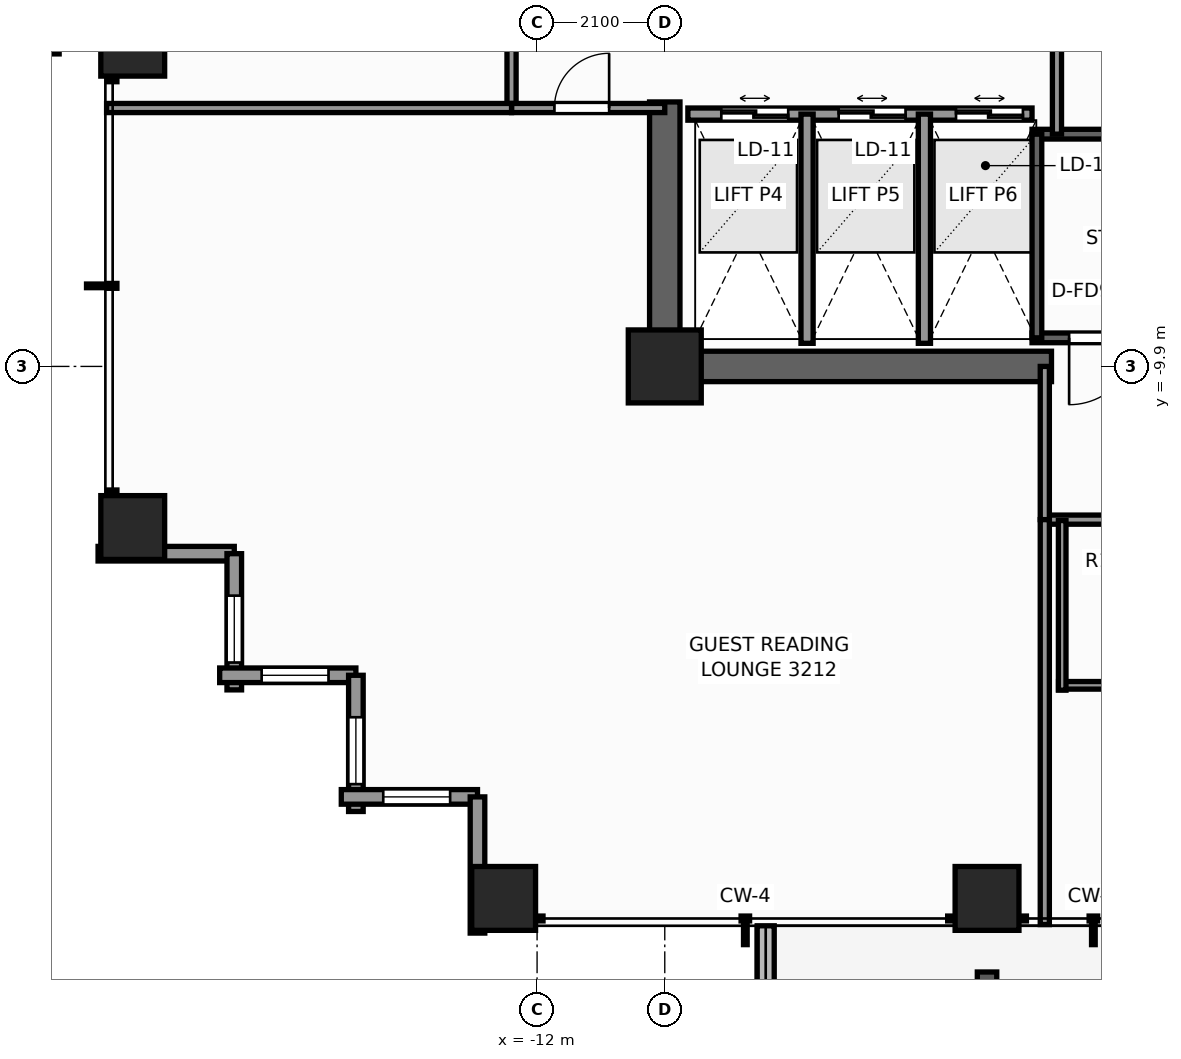
"""IFC4 building model, lengths in metres.
Left out: names, types, materials, properties, quantities, classifications, styles, units other than length and angle.
Written with IfcOpenShell. Run it as: python <this file> out.ifc"""

import sys

from ifc_helpers import new_model, si_unit, direction, frame, frame_2d, origin, origin_2d, place, context, subcontext, project, spatial, rectangle, extrude, element, fill, save


model = new_model("IFC4")
c1 = context("Model", 3, precision=1e-05, world=origin(), true_north=direction((0.0, 1.0)))
c2 = subcontext(c1, "Body", "Model", "MODEL_VIEW")
j1 = project(units=[si_unit("LENGTHUNIT", "METRE"), si_unit("PLANEANGLEUNIT", "RADIAN")], contexts=[c1])
p1 = place(None, origin())
s1 = spatial("IfcSite", under=j1, at=p1, CompositionType="ELEMENT")
p2 = place(p1, origin())
s2 = spatial("IfcBuilding", under=s1, at=p2, CompositionType="ELEMENT")
p3 = place(p2, frame((0.0, 0.0, 111.8)))
s3 = spatial("IfcBuildingStorey", under=s2, at=p3, CompositionType="ELEMENT", Elevation=111.8)
p4 = place(p3, frame((-3.54, -9.9, 0.0), z_axis=(0.0, 0.0, 1.0), x_axis=(-1.0, 0.0, 0.0)))
e1 = element("IfcWall", 1, at=p4, inside=s3, PredefinedType="SHEAR", context=c2, shape_type="SweptSolid", body=[
    extrude(rectangle(XDim=6.61, YDim=0.5, at=frame_2d((3.305, 0.0))), origin(), (0.0, 0.0, 1.0), 3.3),
])
p5 = place(p3, frame((-9.9, -9.65, 0.0), z_axis=(0.0, 0.0, 1.0), x_axis=(0.0, 1.0, 0.0)))
e2 = element("IfcWall", 2, at=p5, inside=s3, PredefinedType="SHEAR", context=c2, shape_type="SweptSolid", body=[
    extrude(rectangle(XDim=4.1, YDim=0.5, at=frame_2d((2.05, 0.0))), origin(), (0.0, 0.0, 1.0), 3.3),
])
p6 = place(p3, frame((-9.9, -9.9, 0.0), z_axis=(0.0, 0.0, 1.0), x_axis=(1.0, 0.0, 0.0)))
e3 = element("IfcColumn", 3, at=p6, inside=s3, PredefinedType="COLUMN", context=c2, shape_type="SweptSolid", body=[
    extrude(rectangle(XDim=1.2, YDim=1.2, at=origin_2d()), origin(), (0.0, 0.0, 1.0), 3.3),
])
for number, where, z_axis, x_axis in (
    (4, (-12.55, -18.65, 0.0), (0.0, 0.0, 1.0), (1.0, 0.0, 0.0)),
    (5, (-4.6, -18.65, 0.0), (0.0, 0.0, 1.0), (1.0, 0.0, 0.0)),
    (6, (-18.65, -12.55, 0.0), (0.0, 0.0, 1.0), (1.0, 0.0, 0.0)),
    (7, (-18.65, -4.6, 0.0), (0.0, 0.0, 1.0), (1.0, 0.0, 0.0)),
):
    element("IfcColumn", number, at=place(p3, frame(where, z_axis=z_axis, x_axis=x_axis)), inside=s3, PredefinedType="COLUMN", context=c2, shape_type="SweptSolid", body=[
        extrude(rectangle(XDim=1.05, YDim=1.05, at=origin_2d()), origin(), (0.0, 0.0, 1.0), 3.3),
    ])
p7 = place(p3, frame((-8.24, -19.1, -0.04), z_axis=(0.0, 0.0, 1.0), x_axis=(0.0, -1.0, 0.0)))
e8 = element("IfcWall", 8, at=p7, inside=s3, PredefinedType="PARAPET", context=c2, shape_type="SweptSolid", body=[
    extrude(rectangle(XDim=1.466, YDim=0.28, at=frame_2d((0.733, 0.0))), origin(), (0.0, 0.0, 1.0), 0.42),
])
p8 = place(p3, frame((-16.98, -12.98, 0.0), z_axis=(0.0, 0.0, 1.0), x_axis=(-1.0, 0.0, 0.0)))
e9 = element("IfcWall", 9, at=p8, inside=s3, PredefinedType="STANDARD", context=c2, shape_type="SweptSolid", body=[
    extrude(rectangle(XDim=2.24, YDim=0.24, at=frame_2d((1.12, 0.0))), origin(), (0.0, 0.0, 1.0), 2.459),
])
p9 = place(p3, frame((-16.98, -15.22, 0.0), z_axis=(0.0, 0.0, 1.0), x_axis=(0.0, 1.0, 0.0)))
e10 = element("IfcWall", 10, at=p9, inside=s3, PredefinedType="STANDARD", context=c2, shape_type="SweptSolid", body=[
    extrude(rectangle(XDim=2.24, YDim=0.24, at=frame_2d((1.12, 0.0))), origin(), (0.0, 0.0, 1.0), 2.459),
])
p10 = place(p9, frame((0.45, 0.0, 0.65)))
e11 = element("IfcOpeningElement", 11, at=p10, cuts=e10, PredefinedType="OPENING", context=c2, shape_type="SweptSolid", body=[
    extrude(rectangle(XDim=1.1, YDim=1.45, at=frame_2d((0.55, 0.725))), frame((0.0, 0.13, 0.0), z_axis=(0.0, -1.0, 0.0), x_axis=(1.0, 0.0, 0.0)), (0.0, 0.0, 1.0), 0.26),
])
p11 = place(p3, frame((-14.98, -14.98, 0.0), z_axis=(0.0, 0.0, 1.0), x_axis=(-1.0, 0.0, 0.0)))
e12 = element("IfcWall", 12, at=p11, inside=s3, PredefinedType="STANDARD", context=c2, shape_type="SweptSolid", body=[
    extrude(rectangle(XDim=2.24, YDim=0.24, at=frame_2d((1.12, 0.0))), origin(), (0.0, 0.0, 1.0), 2.459),
])
p12 = place(p11, frame((0.45, 0.0, 0.65)))
e13 = element("IfcOpeningElement", 13, at=p12, cuts=e12, PredefinedType="OPENING", context=c2, shape_type="SweptSolid", body=[
    extrude(rectangle(XDim=1.1, YDim=1.45, at=frame_2d((0.55, 0.725))), frame((0.0, 0.13, 0.0), z_axis=(0.0, -1.0, 0.0), x_axis=(1.0, 0.0, 0.0)), (0.0, 0.0, 1.0), 0.26),
])
p13 = place(p3, frame((-14.98, -17.22, 0.0), z_axis=(0.0, 0.0, 1.0), x_axis=(0.0, 1.0, 0.0)))
e14 = element("IfcWall", 14, at=p13, inside=s3, PredefinedType="STANDARD", context=c2, shape_type="SweptSolid", body=[
    extrude(rectangle(XDim=2.24, YDim=0.24, at=frame_2d((1.12, 0.0))), origin(), (0.0, 0.0, 1.0), 2.459),
])
p14 = place(p13, frame((0.45, 0.0, 0.65)))
e15 = element("IfcOpeningElement", 15, at=p14, cuts=e14, PredefinedType="OPENING", context=c2, shape_type="SweptSolid", body=[
    extrude(rectangle(XDim=1.1, YDim=1.45, at=frame_2d((0.55, 0.725))), frame((0.0, 0.13, 0.0), z_axis=(0.0, -1.0, 0.0), x_axis=(1.0, 0.0, 0.0)), (0.0, 0.0, 1.0), 0.26),
])
p15 = place(p3, frame((-12.98, -16.98, 0.0), z_axis=(0.0, 0.0, 1.0), x_axis=(-1.0, 0.0, 0.0)))
e16 = element("IfcWall", 16, at=p15, inside=s3, PredefinedType="STANDARD", context=c2, shape_type="SweptSolid", body=[
    extrude(rectangle(XDim=2.24, YDim=0.24, at=frame_2d((1.12, 0.0))), origin(), (0.0, 0.0, 1.0), 2.459),
])
p16 = place(p15, frame((0.45, 0.0, 0.65)))
e17 = element("IfcOpeningElement", 17, at=p16, cuts=e16, PredefinedType="OPENING", context=c2, shape_type="SweptSolid", body=[
    extrude(rectangle(XDim=1.1, YDim=1.45, at=frame_2d((0.55, 0.725))), frame((0.0, 0.13, 0.0), z_axis=(0.0, -1.0, 0.0), x_axis=(1.0, 0.0, 0.0)), (0.0, 0.0, 1.0), 0.26),
])
p17 = place(p3, frame((-12.98, -19.22, 0.0), z_axis=(0.0, 0.0, 1.0), x_axis=(0.0, 1.0, 0.0)))
e18 = element("IfcWall", 18, at=p17, inside=s3, PredefinedType="STANDARD", context=c2, shape_type="SweptSolid", body=[
    extrude(rectangle(XDim=2.24, YDim=0.24, at=frame_2d((1.12, 0.0))), origin(), (0.0, 0.0, 1.0), 2.459),
])
p18 = place(p3, frame((3.86, -9.43, 0.0), z_axis=(0.0, 0.0, 1.0), x_axis=(-1.0, 0.0, 0.0)))
e19 = element("IfcWall", 19, at=p18, inside=s3, PredefinedType="SHEAR", context=c2, shape_type="SweptSolid", body=[
    extrude(rectangle(XDim=7.72, YDim=0.16, at=frame_2d((3.86, 0.0))), origin(), (0.0, 0.0, 1.0), 3.3),
])
p19 = place(p18, frame((6.01, 0.0, 0.0)))
e20 = element("IfcOpeningElement", 20, at=p19, cuts=e19, PredefinedType="OPENING", context=c2, shape_type="SweptSolid", body=[
    extrude(rectangle(XDim=1.1, YDim=2.2, at=frame_2d((0.55, 1.1))), frame((0.0, 0.09, 0.0), z_axis=(0.0, -1.0, 0.0), x_axis=(1.0, 0.0, 0.0)), (0.0, 0.0, 1.0), 0.18),
])
p20 = place(p3, frame((-3.86, -6.08, 0.0), z_axis=(0.0, 0.0, 1.0), x_axis=(1.0, 0.0, 0.0)))
e21 = element("IfcWall", 21, at=p20, inside=s3, PredefinedType="SHEAR", context=c2, shape_type="SweptSolid", body=[
    extrude(rectangle(XDim=7.72, YDim=0.16, at=frame_2d((3.86, 0.0))), origin(), (0.0, 0.0, 1.0), 3.3),
])
p21 = place(p3, frame((-3.78, -9.43, 0.0), z_axis=(0.0, 0.0, 1.0), x_axis=(0.0, 1.0, 0.0)))
e22 = element("IfcWall", 22, at=p21, inside=s3, PredefinedType="SHEAR", context=c2, shape_type="SweptSolid", body=[
    extrude(rectangle(XDim=3.35, YDim=0.16, at=frame_2d((1.675, 0.0))), origin(), (0.0, 0.0, 1.0), 3.3),
])
p22 = place(p3, frame((-9.52, -5.75, 0.0), z_axis=(0.0, 0.0, 1.0), x_axis=(1.0, 0.0, 0.0)))
e23 = element("IfcWall", 23, at=p22, inside=s3, PredefinedType="SOLIDWALL", context=c2, shape_type="SweptSolid", body=[
    extrude(rectangle(XDim=5.66, YDim=0.2, at=frame_2d((2.83, 0.0))), origin(), (0.0, 0.0, 1.0), 3.08),
])
p23 = place(p22, frame((0.55, 0.0, 0.0)))
e24 = element("IfcOpeningElement", 24, at=p23, cuts=e23, PredefinedType="OPENING", context=c2, shape_type="SweptSolid", body=[
    extrude(rectangle(XDim=1.1, YDim=2.2, at=frame_2d((0.55, 1.1))), frame((0.0, 0.11, 0.0), z_axis=(0.0, -1.0, 0.0), x_axis=(1.0, 0.0, 0.0)), (0.0, 0.0, 1.0), 0.22),
])
p24 = place(p22, frame((2.48, 0.0, 0.0)))
e25 = element("IfcOpeningElement", 25, at=p24, cuts=e23, PredefinedType="OPENING", context=c2, shape_type="SweptSolid", body=[
    extrude(rectangle(XDim=1.1, YDim=2.2, at=frame_2d((0.55, 1.1))), frame((0.0, 0.11, 0.0), z_axis=(0.0, -1.0, 0.0), x_axis=(1.0, 0.0, 0.0)), (0.0, 0.0, 1.0), 0.22),
])
p25 = place(p22, frame((4.41, 0.0, 0.0)))
e26 = element("IfcOpeningElement", 26, at=p25, cuts=e23, PredefinedType="OPENING", context=c2, shape_type="SweptSolid", body=[
    extrude(rectangle(XDim=1.1, YDim=2.2, at=frame_2d((0.55, 1.1))), frame((0.0, 0.11, 0.0), z_axis=(0.0, -1.0, 0.0), x_axis=(1.0, 0.0, 0.0)), (0.0, 0.0, 1.0), 0.22),
])
for number, where, z_axis, x_axis in (
    (27, (-7.56, -9.52, 0.0), (0.0, 0.0, 1.0), (0.0, 1.0, 0.0)),
    (28, (-5.63, -9.52, 0.0), (0.0, 0.0, 1.0), (0.0, 1.0, 0.0)),
):
    element("IfcWall", number, at=place(p3, frame(where, z_axis=z_axis, x_axis=x_axis)), inside=s3, PredefinedType="SOLIDWALL", context=c2, shape_type="SweptSolid", body=[
        extrude(rectangle(XDim=3.77, YDim=0.2, at=frame_2d((1.885, 0.0))), origin(), (0.0, 0.0, 1.0), 3.08),
    ])
p26 = place(p3, frame((-3.45, -6.08, 0.0), z_axis=(0.0, 0.0, 1.0), x_axis=(0.0, 1.0, 0.0)))
e29 = element("IfcWall", 29, at=p26, inside=s3, PredefinedType="PARTITIONING", context=c2, shape_type="SweptSolid", body=[
    extrude(rectangle(XDim=2.36, YDim=0.15, at=frame_2d((1.18, 0.0))), origin(), (0.0, 0.0, 1.0), 3.08),
])
p27 = place(p3, frame((-3.65, -12.42, 0.0), z_axis=(0.0, 0.0, 1.0), x_axis=(1.0, 0.0, 0.0)))
e30 = element("IfcWall", 30, at=p27, inside=s3, PredefinedType="PARTITIONING", context=c2, shape_type="SweptSolid", body=[
    extrude(rectangle(XDim=15.91, YDim=0.15, at=frame_2d((7.955, 0.0))), origin(), (0.0, 0.0, 1.0), 2.292),
])
p28 = place(p27, frame((4.612, 0.0, 0.0)))
e31 = element("IfcOpeningElement", 31, at=p28, cuts=e30, PredefinedType="OPENING", context=c2, shape_type="SweptSolid", body=[
    extrude(rectangle(XDim=0.95, YDim=2.06, at=frame_2d((0.475, 1.03))), frame((0.0, 0.085, 0.0), z_axis=(0.0, -1.0, 0.0), x_axis=(1.0, 0.0, 0.0)), (0.0, 0.0, 1.0), 0.17),
])
p29 = place(p27, frame((9.17, 0.0, 0.0)))
e32 = element("IfcOpeningElement", 32, at=p29, cuts=e30, PredefinedType="OPENING", context=c2, shape_type="SweptSolid", body=[
    extrude(rectangle(XDim=0.95, YDim=2.06, at=frame_2d((0.475, 1.03))), frame((0.0, 0.085, 0.0), z_axis=(0.0, -1.0, 0.0), x_axis=(1.0, 0.0, 0.0)), (0.0, 0.0, 1.0), 0.17),
])
p30 = place(p27, frame((11.192, 0.0, 0.0)))
e33 = element("IfcOpeningElement", 33, at=p30, cuts=e30, PredefinedType="OPENING", context=c2, shape_type="SweptSolid", body=[
    extrude(rectangle(XDim=0.95, YDim=2.06, at=frame_2d((0.475, 1.03))), frame((0.0, 0.085, 0.0), z_axis=(0.0, -1.0, 0.0), x_axis=(1.0, 0.0, 0.0)), (0.0, 0.0, 1.0), 0.17),
])
p31 = place(p3, frame((-3.65, -12.42, 0.0), z_axis=(0.0, 0.0, 1.0), x_axis=(0.0, 1.0, 0.0)))
e34 = element("IfcWall", 34, at=p31, inside=s3, PredefinedType="PARTITIONING", context=c2, shape_type="SweptSolid", body=[
    extrude(rectangle(XDim=2.52, YDim=0.15, at=frame_2d((1.26, 0.0))), origin(), (0.0, 0.0, 1.0), 3.08),
])
p32 = place(p3, frame((-12.42, -5.65, 0.0), z_axis=(0.0, 0.0, 1.0), x_axis=(0.0, 1.0, 0.0)))
e35 = element("IfcWall", 35, at=p32, inside=s3, PredefinedType="PARTITIONING", context=c2, shape_type="SweptSolid", body=[
    extrude(rectangle(XDim=3.6, YDim=0.15, at=frame_2d((1.8, 0.0))), origin(), (0.0, 0.0, 1.0), 2.292),
])
p33 = place(p32, frame((2.156, 0.0, 0.0)))
e36 = element("IfcOpeningElement", 36, at=p33, cuts=e35, PredefinedType="OPENING", context=c2, shape_type="SweptSolid", body=[
    extrude(rectangle(XDim=0.9, YDim=2.06, at=frame_2d((0.45, 1.03))), frame((0.0, 0.085, 0.0), z_axis=(0.0, -1.0, 0.0), x_axis=(1.0, 0.0, 0.0)), (0.0, 0.0, 1.0), 0.17),
])
p34 = place(p3, frame((-12.42, -5.65, 0.0), z_axis=(0.0, 0.0, 1.0), x_axis=(1.0, 0.0, 0.0)))
e37 = element("IfcWall", 37, at=p34, inside=s3, PredefinedType="PARTITIONING", context=c2, shape_type="SweptSolid", body=[
    extrude(rectangle(XDim=2.52, YDim=0.15, at=frame_2d((1.26, 0.0))), origin(), (0.0, 0.0, 1.0), 3.08),
])
p35 = place(p34, frame((0.705, 0.0, 0.0)))
e38 = element("IfcOpeningElement", 38, at=p35, cuts=e37, PredefinedType="OPENING", context=c2, shape_type="SweptSolid", body=[
    extrude(rectangle(XDim=0.9, YDim=2.06, at=frame_2d((0.45, 1.03))), frame((0.0, 0.085, 0.0), z_axis=(0.0, -1.0, 0.0), x_axis=(1.0, 0.0, 0.0)), (0.0, 0.0, 1.0), 0.17),
])
for number, where, z_axis, x_axis in (
    (39, (-19.08, -5.65, 0.0), (0.0, 0.0, 1.0), (1.0, 0.0, 0.0)),
    (40, (-3.65, -19.08, 0.0), (0.0, 0.0, 1.0), (0.0, 1.0, 0.0)),
):
    element("IfcWall", number, at=place(p3, frame(where, z_axis=z_axis, x_axis=x_axis)), inside=s3, PredefinedType="PARTITIONING", context=c2, shape_type="SweptSolid", body=[
        extrude(rectangle(XDim=6.66, YDim=0.15, at=frame_2d((3.33, 0.0))), origin(), (0.0, 0.0, 1.0), 2.449),
    ])
p36 = place(p3, frame((-3.424, -15.145, 0.0), z_axis=(0.0, 0.0, 1.0), x_axis=(1.0, 0.0, 0.0)))
e41 = element("IfcWall", 41, at=p36, inside=s3, PredefinedType="PARTITIONING", context=c2, shape_type="SweptSolid", body=[
    extrude(rectangle(XDim=2.37, YDim=0.125, at=frame_2d((1.185, 0.0))), origin(), (0.0, 0.0, 1.0), 3.08),
])
p37 = place(p3, frame((-3.364, -15.225, 0.0), z_axis=(0.0, 0.0, 1.0), x_axis=(0.0, 1.0, 0.0)))
e42 = element("IfcWall", 42, at=p37, inside=s3, PredefinedType="PARTITIONING", context=c2, shape_type="SweptSolid", body=[
    extrude(rectangle(XDim=2.79, YDim=0.125, at=frame_2d((1.395, 0.0))), origin(), (0.0, 0.0, 1.0), 3.08),
])
p38 = place(p10, origin())
e43 = element("IfcWindow", 43, at=p38, inside=s3, PartitioningType="SINGLE_PANEL", PredefinedType="WINDOW", context=c2, shape_type="SweptSolid", body=[
    extrude(rectangle(XDim=1.1, YDim=1.45, at=frame_2d((0.55, 0.725))), frame((0.0, 0.03, 0.0), z_axis=(0.0, -1.0, 0.0), x_axis=(1.0, 0.0, 0.0)), (0.0, 0.0, 1.0), 0.06),
])
fill(e11, e43)
p39 = place(p12, origin())
e44 = element("IfcWindow", 44, at=p39, inside=s3, PartitioningType="SINGLE_PANEL", PredefinedType="WINDOW", context=c2, shape_type="SweptSolid", body=[
    extrude(rectangle(XDim=1.1, YDim=1.45, at=frame_2d((0.55, 0.725))), frame((0.0, 0.03, 0.0), z_axis=(0.0, -1.0, 0.0), x_axis=(1.0, 0.0, 0.0)), (0.0, 0.0, 1.0), 0.06),
])
fill(e13, e44)
p40 = place(p14, origin())
e45 = element("IfcWindow", 45, at=p40, inside=s3, PartitioningType="SINGLE_PANEL", PredefinedType="WINDOW", context=c2, shape_type="SweptSolid", body=[
    extrude(rectangle(XDim=1.1, YDim=1.45, at=frame_2d((0.55, 0.725))), frame((0.0, 0.03, 0.0), z_axis=(0.0, -1.0, 0.0), x_axis=(1.0, 0.0, 0.0)), (0.0, 0.0, 1.0), 0.06),
])
fill(e15, e45)
p41 = place(p16, origin())
e46 = element("IfcWindow", 46, at=p41, inside=s3, PartitioningType="SINGLE_PANEL", PredefinedType="WINDOW", context=c2, shape_type="SweptSolid", body=[
    extrude(rectangle(XDim=1.1, YDim=1.45, at=frame_2d((0.55, 0.725))), frame((0.0, 0.03, 0.0), z_axis=(0.0, -1.0, 0.0), x_axis=(1.0, 0.0, 0.0)), (0.0, 0.0, 1.0), 0.06),
])
fill(e17, e46)
p42 = place(p19, origin())
e47 = element("IfcDoor", 47, at=p42, inside=s3, OperationType="SINGLE_SWING_RIGHT", PredefinedType="DOOR", context=c2, shape_type="SweptSolid", body=[
    extrude(rectangle(XDim=1.1, YDim=2.2, at=frame_2d((0.55, 1.1))), frame((0.0, 0.025, 0.0), z_axis=(0.0, -1.0, 0.0), x_axis=(1.0, 0.0, 0.0)), (0.0, 0.0, 1.0), 0.05),
])
fill(e20, e47)
p43 = place(p23, origin())
e48 = element("IfcDoor", 48, at=p43, inside=s3, OperationType="DOUBLE_DOOR_SLIDING", PredefinedType="DOOR", context=c2, shape_type="SweptSolid", body=[
    extrude(rectangle(XDim=1.1, YDim=2.2, at=frame_2d((0.55, 1.1))), frame((0.0, 0.025, 0.0), z_axis=(0.0, -1.0, 0.0), x_axis=(1.0, 0.0, 0.0)), (0.0, 0.0, 1.0), 0.05),
])
fill(e24, e48)
p44 = place(p24, origin())
e49 = element("IfcDoor", 49, at=p44, inside=s3, OperationType="DOUBLE_DOOR_SLIDING", PredefinedType="DOOR", context=c2, shape_type="SweptSolid", body=[
    extrude(rectangle(XDim=1.1, YDim=2.2, at=frame_2d((0.55, 1.1))), frame((0.0, 0.025, 0.0), z_axis=(0.0, -1.0, 0.0), x_axis=(1.0, 0.0, 0.0)), (0.0, 0.0, 1.0), 0.05),
])
fill(e25, e49)
p45 = place(p25, origin())
e50 = element("IfcDoor", 50, at=p45, inside=s3, OperationType="DOUBLE_DOOR_SLIDING", PredefinedType="DOOR", context=c2, shape_type="SweptSolid", body=[
    extrude(rectangle(XDim=1.1, YDim=2.2, at=frame_2d((0.55, 1.1))), frame((0.0, 0.025, 0.0), z_axis=(0.0, -1.0, 0.0), x_axis=(1.0, 0.0, 0.0)), (0.0, 0.0, 1.0), 0.05),
])
fill(e26, e50)
p46 = place(p35, origin())
e51 = element("IfcDoor", 51, at=p46, inside=s3, OperationType="SINGLE_SWING_RIGHT", PredefinedType="DOOR", context=c2, shape_type="SweptSolid", body=[
    extrude(rectangle(XDim=0.9, YDim=2.06, at=frame_2d((0.45, 1.03))), frame((0.0, 0.025, 0.0), z_axis=(0.0, -1.0, 0.0), x_axis=(1.0, 0.0, 0.0)), (0.0, 0.0, 1.0), 0.05),
])
fill(e38, e51)
save(model, sys.argv[1])
